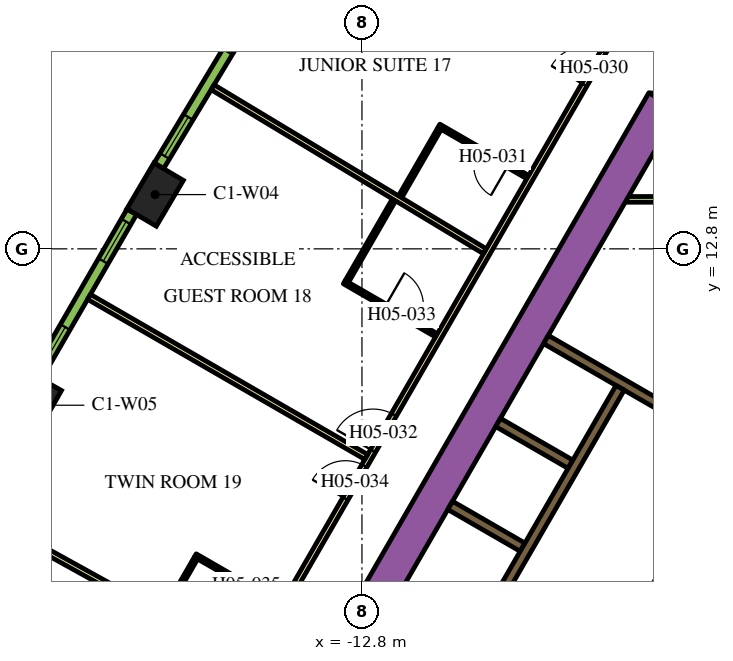
"""IFC4 building model, lengths in metres.
Left out: names, types, materials, properties, quantities, classifications, styles, units other than length and angle.
Written with IfcOpenShell. Run it as: python <this file> out.ifc"""

import sys

from ifc_helpers import new_model, si_unit, direction, frame, frame_2d, origin, origin_2d, place, context, subcontext, project, spatial, polyline, rectangle, outline, extrude, element, fill, save


model = new_model("IFC4")
c1 = context("Model", 3, precision=1e-05, world=origin(), true_north=direction((0.0, 1.0)))
c2 = subcontext(c1, "Body", "Model", "MODEL_VIEW")
j1 = project(units=[si_unit("LENGTHUNIT", "METRE"), si_unit("PLANEANGLEUNIT", "RADIAN")], contexts=[c1])
p1 = place(None, origin())
s1 = spatial("IfcSite", under=j1, at=p1, CompositionType="ELEMENT")
p2 = place(p1, origin())
s2 = spatial("IfcBuilding", under=s1, at=p2, CompositionType="ELEMENT")
p3 = place(p2, frame((0.0, 0.0, 74.4)))
s3 = spatial("IfcBuildingStorey", under=s2, at=p3, CompositionType="ELEMENT", Elevation=74.4)
for number, where, z_axis, x_axis in (
    (1, (-18.243, 14.228, 0.0), (0.0, 0.0, 1.0), (-0.508, -0.861, 0.0)),
    (2, (-21.443, 8.685, 0.0), (0.0, 0.0, 1.0), (-0.492, -0.871, 0.0)),
):
    element("IfcColumn", number, at=place(p3, frame(where, z_axis=z_axis, x_axis=x_axis)), inside=s3, PredefinedType="COLUMN", context=c2, shape_type="SweptSolid", body=[
        extrude(rectangle(XDim=1.4, YDim=0.9, at=origin_2d()), origin(), (0.0, 0.0, 1.0), 3.9),
    ])
p4 = place(p3, frame((-15.36, -1.503, 0.0), z_axis=(0.0, 0.0, 1.0), x_axis=(0.50000389221, 0.866023156604, 0.0)))
e3 = element("IfcWall", 3, at=p4, inside=s3, PredefinedType="SOLIDWALL", context=c2, shape_type="SweptSolid", body=[
    extrude(rectangle(XDim=21.0, YDim=0.9, at=frame_2d((10.5, 0.0))), origin(), (0.0, 0.0, 1.0), 3.9),
])
p5 = place(p3, origin())
e4 = element("IfcWall", 4, at=p5, inside=s3, PredefinedType="SOLIDWALL", context=c2, shape_type="SweptSolid", body=[
    extrude(outline(polyline([(-4.215, 16.9), (-4.469, 16.46), (-5.231, 16.9), (-4.215, 16.9)])), origin(), (0.0, 0.0, 1.0), 3.9),
])
p6 = place(p3, frame((-8.06, -1.311, 0.0), z_axis=(0.0, 0.0, 1.0), x_axis=(0.50000273126, 0.866023826885, 0.0)))
e5 = element("IfcWall", 5, at=p6, inside=s3, PredefinedType="SOLIDWALL", context=c2, shape_type="SweptSolid", body=[
    extrude(rectangle(XDim=10.33, YDim=0.25, at=frame_2d((5.165, 0.0))), origin(), (0.0, 0.0, 1.0), 3.9),
])
for number, where, z_axis, x_axis in (
    (6, (-8.574, 4.95, 0.0), (0.0, 0.0, 1.0), (-0.866, 0.5, 0.0)),
    (7, (-7.314, 7.132, 0.0), (0.0, 0.0, 1.0), (-0.866, 0.5, 0.0)),
):
    element("IfcWall", number, at=place(p3, frame(where, z_axis=z_axis, x_axis=x_axis)), inside=s3, PredefinedType="SOLIDWALL", context=c2, shape_type="SweptSolid", body=[
        extrude(rectangle(XDim=2.2, YDim=0.25, at=frame_2d((1.1, 0.0))), origin(), (0.0, 0.0, 1.0), 3.9),
    ])
p7 = place(p3, frame((-7.959, 10.415, 0.0), z_axis=(0.0, 0.0, 1.0), x_axis=(0.866020958405, -0.500007699544, 0.0)))
e8 = element("IfcWall", 8, at=p7, inside=s3, PredefinedType="SOLIDWALL", context=c2, shape_type="SweptSolid", body=[
    extrude(rectangle(XDim=4.1, YDim=0.25, at=frame_2d((2.05, 0.0))), origin(), (0.0, 0.0, 1.0), 3.9),
])
p8 = place(p3, frame((-5.851, 14.102, 0.0), z_axis=(0.0, 0.0, 1.0), x_axis=(1.0, 0.0, 0.0)))
e9 = element("IfcWall", 9, at=p8, inside=s3, PredefinedType="PARTITIONING", context=c2, shape_type="SweptSolid", body=[
    extrude(rectangle(XDim=1.18, YDim=0.15, at=frame_2d((0.59, 0.0))), origin(), (0.0, 0.0, 1.0), 2.7),
])
p9 = place(p3, frame((-6.008, 9.144, 0.0), z_axis=(0.0, 0.0, 1.0), x_axis=(-0.500006956611, -0.866021387346, 0.0)))
e10 = element("IfcWall", 10, at=p9, inside=s3, PredefinedType="SOLIDWALL", context=c2, shape_type="SweptSolid", body=[
    extrude(rectangle(XDim=9.83, YDim=0.25, at=frame_2d((4.915, 0.0))), origin(), (0.0, 0.0, 1.0), 3.9),
])
p10 = place(p9, frame((6.985, 0.0, 0.0)))
e11 = element("IfcOpeningElement", 11, at=p10, cuts=e10, PredefinedType="OPENING", context=c2, shape_type="SweptSolid", body=[
    extrude(rectangle(XDim=0.9, YDim=2.1, at=frame_2d((0.45, 1.05))), frame((0.0, 0.135, 0.0), z_axis=(0.0, -1.0, 0.0), x_axis=(1.0, 0.0, 0.0)), (0.0, 0.0, 1.0), 0.27),
])
p11 = place(p3, frame((-0.898, 6.194, 0.0), z_axis=(0.0, 0.0, 1.0), x_axis=(-0.499996202215, -0.866027596426, 0.0)))
e12 = element("IfcWall", 12, at=p11, inside=s3, PredefinedType="SOLIDWALL", context=c2, shape_type="SweptSolid", body=[
    extrude(rectangle(XDim=9.83, YDim=0.25, at=frame_2d((4.915, 0.0))), origin(), (0.0, 0.0, 1.0), 3.9),
])
p12 = place(p11, frame((0.585, 0.0, 0.0)))
e13 = element("IfcOpeningElement", 13, at=p12, cuts=e12, PredefinedType="OPENING", context=c2, shape_type="SweptSolid", body=[
    extrude(rectangle(XDim=1.1, YDim=2.1, at=frame_2d((0.55, 1.05))), frame((0.0, 0.135, 0.0), z_axis=(0.0, -1.0, 0.0), x_axis=(1.0, 0.0, 0.0)), (0.0, 0.0, 1.0), 0.27),
])
p13 = place(p11, frame((3.105, 0.0, 0.0)))
e14 = element("IfcOpeningElement", 14, at=p13, cuts=e12, PredefinedType="OPENING", context=c2, shape_type="SweptSolid", body=[
    extrude(rectangle(XDim=1.1, YDim=2.1, at=frame_2d((0.55, 1.05))), frame((0.0, 0.135, 0.0), z_axis=(0.0, -1.0, 0.0), x_axis=(1.0, 0.0, 0.0)), (0.0, 0.0, 1.0), 0.27),
])
p14 = place(p11, frame((5.625, 0.0, 0.0)))
e15 = element("IfcOpeningElement", 15, at=p14, cuts=e12, PredefinedType="OPENING", context=c2, shape_type="SweptSolid", body=[
    extrude(rectangle(XDim=1.1, YDim=2.1, at=frame_2d((0.55, 1.05))), frame((0.0, 0.135, 0.0), z_axis=(0.0, -1.0, 0.0), x_axis=(1.0, 0.0, 0.0)), (0.0, 0.0, 1.0), 0.27),
])
p15 = place(p11, frame((8.145, 0.0, 0.0)))
e16 = element("IfcOpeningElement", 16, at=p15, cuts=e12, PredefinedType="OPENING", context=c2, shape_type="SweptSolid", body=[
    extrude(rectangle(XDim=1.1, YDim=2.1, at=frame_2d((0.55, 1.05))), frame((0.0, 0.135, 0.0), z_axis=(0.0, -1.0, 0.0), x_axis=(1.0, 0.0, 0.0)), (0.0, 0.0, 1.0), 0.27),
])
p16 = place(p3, frame((-19.081, -3.9, 0.0), z_axis=(0.0, 0.0, 1.0), x_axis=(0.499998313975, 0.866026377209, 0.0)))
e17 = element("IfcWall", 17, at=p16, inside=s3, PredefinedType="PARTITIONING", context=c2, shape_type="SweptSolid", body=[
    extrude(rectangle(XDim=25.766, YDim=0.15, at=frame_2d((12.883, 0.0))), origin(), (0.0, 0.0, 1.0), 2.7),
])
p17 = place(p16, frame((24.265, 0.0, 0.0)))
e18 = element("IfcOpeningElement", 18, at=p17, cuts=e17, PredefinedType="OPENING", context=c2, shape_type="SweptSolid", body=[
    extrude(rectangle(XDim=1.0, YDim=2.1, at=frame_2d((0.5, 1.05))), frame((0.0, 0.085, 0.0), z_axis=(0.0, -1.0, 0.0), x_axis=(1.0, 0.0, 0.0)), (0.0, 0.0, 1.0), 0.17),
])
p18 = place(p16, frame((13.146, 0.0, 0.0)))
e19 = element("IfcOpeningElement", 19, at=p18, cuts=e17, PredefinedType="OPENING", context=c2, shape_type="SweptSolid", body=[
    extrude(rectangle(XDim=1.1, YDim=2.1, at=frame_2d((0.55, 1.05))), frame((0.0, 0.085, 0.0), z_axis=(0.0, -1.0, 0.0), x_axis=(1.0, 0.0, 0.0)), (0.0, 0.0, 1.0), 0.17),
])
p19 = place(p16, frame((11.693, 0.0, 0.0)))
e20 = element("IfcOpeningElement", 20, at=p19, cuts=e17, PredefinedType="OPENING", context=c2, shape_type="SweptSolid", body=[
    extrude(rectangle(XDim=1.0, YDim=2.1, at=frame_2d((0.5, 1.05))), frame((0.0, 0.085, 0.0), z_axis=(0.0, -1.0, 0.0), x_axis=(1.0, 0.0, 0.0)), (0.0, 0.0, 1.0), 0.17),
])
p20 = place(p16, frame((0.18, 0.0, 0.0)))
e21 = element("IfcOpeningElement", 21, at=p20, cuts=e17, PredefinedType="OPENING", context=c2, shape_type="SweptSolid", body=[
    extrude(rectangle(XDim=1.0, YDim=2.1, at=frame_2d((0.5, 1.05))), frame((0.0, 0.085, 0.0), z_axis=(0.0, -1.0, 0.0), x_axis=(1.0, 0.0, 0.0)), (0.0, 0.0, 1.0), 0.17),
])
p21 = place(p3, frame((-23.132, 5.962, 0.0), z_axis=(0.0, 0.0, 1.0), x_axis=(0.875121716713, -0.483902863121, 0.0)))
e22 = element("IfcWall", 22, at=p21, inside=s3, PredefinedType="PARTITIONING", context=c2, shape_type="SweptSolid", body=[
    extrude(rectangle(XDim=8.355, YDim=0.15, at=frame_2d((4.178, 0.0))), origin(), (0.0, 0.0, 1.0), 2.7),
])
p22 = place(p3, frame((-19.982, 11.537, 0.0), z_axis=(0.0, 0.0, 1.0), x_axis=(0.866020994654, -0.500007636761, 0.0)))
e23 = element("IfcWall", 23, at=p22, inside=s3, PredefinedType="PARTITIONING", context=c2, shape_type="SweptSolid", body=[
    extrude(rectangle(XDim=8.423, YDim=0.15, at=frame_2d((4.211, 0.0))), origin(), (0.0, 0.0, 1.0), 2.7),
])
p23 = place(p3, frame((-16.729, 17.052, 0.0), z_axis=(0.0, 0.0, 1.0), x_axis=(0.856630606266, -0.515930232113, 0.0)))
e24 = element("IfcWall", 24, at=p23, inside=s3, PredefinedType="PARTITIONING", context=c2, shape_type="SweptSolid", body=[
    extrude(rectangle(XDim=8.355, YDim=0.15, at=frame_2d((4.178, 0.0))), origin(), (0.0, 0.0, 1.0), 2.7),
])
p24 = place(p3, frame((-8.437, 14.687, 0.0), z_axis=(0.0, 0.0, 1.0), x_axis=(-0.866019956843, 0.50000943426, 0.0)))
e25 = element("IfcWall", 25, at=p24, inside=s3, PredefinedType="PARTITIONING", context=c2, shape_type="SweptSolid", body=[
    extrude(rectangle(XDim=2.7, YDim=0.1, at=frame_2d((1.35, 0.0))), origin(), (0.0, 0.0, 1.0), 2.7),
])
p25 = place(p24, frame((0.6, 0.0, 0.0)))
e26 = element("IfcOpeningElement", 26, at=p25, cuts=e25, PredefinedType="OPENING", context=c2, shape_type="SweptSolid", body=[
    extrude(rectangle(XDim=0.9, YDim=2.1, at=frame_2d((0.45, 1.05))), frame((0.0, 0.06, 0.0), z_axis=(0.0, -1.0, 0.0), x_axis=(1.0, 0.0, 0.0)), (0.0, 0.0, 1.0), 0.12),
])
p26 = place(p3, frame((-10.757, 15.969, 0.0), z_axis=(0.0, 0.0, 1.0), x_axis=(-0.499957272447, -0.866050071143, 0.0)))
e27 = element("IfcWall", 27, at=p26, inside=s3, PredefinedType="PARTITIONING", context=c2, shape_type="SweptSolid", body=[
    extrude(rectangle(XDim=2.07, YDim=0.1, at=frame_2d((1.035, 0.0))), origin(), (0.0, 0.0, 1.0), 2.7),
])
p27 = place(p3, frame((-13.265, 11.924, 0.0), z_axis=(0.0, 0.0, 1.0), x_axis=(0.866034573852, -0.49998411664, 0.0)))
e28 = element("IfcWall", 28, at=p27, inside=s3, PredefinedType="PARTITIONING", context=c2, shape_type="SweptSolid", body=[
    extrude(rectangle(XDim=2.8, YDim=0.1, at=frame_2d((1.4, 0.0))), origin(), (0.0, 0.0, 1.0), 2.7),
])
p28 = place(p27, frame((1.25, 0.0, 0.0)))
e29 = element("IfcOpeningElement", 29, at=p28, cuts=e28, PredefinedType="OPENING", context=c2, shape_type="SweptSolid", body=[
    extrude(rectangle(XDim=1.0, YDim=2.1, at=frame_2d((0.5, 1.05))), frame((0.0, 0.06, 0.0), z_axis=(0.0, -1.0, 0.0), x_axis=(1.0, 0.0, 0.0)), (0.0, 0.0, 1.0), 0.12),
])
p29 = place(p3, frame((-13.197, 11.942, 0.0), z_axis=(0.0, 0.0, 1.0), x_axis=(0.499944914708, 0.866057204957, 0.0)))
e30 = element("IfcWall", 30, at=p29, inside=s3, PredefinedType="PARTITIONING", context=c2, shape_type="SweptSolid", body=[
    extrude(rectangle(XDim=2.47, YDim=0.1, at=frame_2d((1.235, 0.0))), origin(), (0.0, 0.0, 1.0), 2.7),
])
p30 = place(p3, frame((-14.935, 3.432, 0.0), z_axis=(0.0, 0.0, 1.0), x_axis=(-0.865997922154, 0.500047596559, 0.0)))
e31 = element("IfcWall", 31, at=p30, inside=s3, PredefinedType="PARTITIONING", context=c2, shape_type="SweptSolid", body=[
    extrude(rectangle(XDim=2.6, YDim=0.1, at=frame_2d((1.3, 0.0))), origin(), (0.0, 0.0, 1.0), 2.7),
])
p31 = place(p30, frame((0.6, 0.0, 0.0)))
e32 = element("IfcOpeningElement", 32, at=p31, cuts=e31, PredefinedType="OPENING", context=c2, shape_type="SweptSolid", body=[
    extrude(rectangle(XDim=0.9, YDim=2.1, at=frame_2d((0.45, 1.05))), frame((0.0, 0.06, 0.0), z_axis=(0.0, -1.0, 0.0), x_axis=(1.0, 0.0, 0.0)), (0.0, 0.0, 1.0), 0.12),
])
p32 = place(p3, frame((-17.168, 4.664, 0.0), z_axis=(0.0, 0.0, 1.0), x_axis=(-0.500085185139, -0.865976216535, 0.0)))
e33 = element("IfcWall", 33, at=p32, inside=s3, PredefinedType="PARTITIONING", context=c2, shape_type="SweptSolid", body=[
    extrude(rectangle(XDim=1.67, YDim=0.1, at=frame_2d((0.835, 0.0))), origin(), (0.0, 0.0, 1.0), 2.7),
])
p33 = place(p3, frame((-15.564, 19.267, 0.0), z_axis=(0.0, 0.0, 1.0), x_axis=(-0.515938796285, -0.856625448191, 0.0)))
e34 = element("IfcWall", 34, at=p33, inside=s3, PredefinedType="SOLIDWALL", context=c2, shape_type="SweptSolid", body=[
    extrude(rectangle(XDim=4.998, YDim=0.29, at=frame_2d((2.499, 0.0))), origin(), (0.0, 0.0, 1.0), 3.6),
])
p34 = place(p33, frame((0.297, 0.0, 0.9)))
e35 = element("IfcOpeningElement", 35, at=p34, cuts=e34, PredefinedType="OPENING", context=c2, shape_type="SweptSolid", body=[
    extrude(rectangle(XDim=1.2, YDim=2.15, at=frame_2d((0.6, 1.075))), frame((0.0, 0.155, 0.0), z_axis=(0.0, -1.0, 0.0), x_axis=(1.0, 0.0, 0.0)), (0.0, 0.0, 1.0), 0.31),
])
p35 = place(p33, frame((3.501, 0.0, 0.9)))
e36 = element("IfcOpeningElement", 36, at=p35, cuts=e34, PredefinedType="OPENING", context=c2, shape_type="SweptSolid", body=[
    extrude(rectangle(XDim=1.2, YDim=2.15, at=frame_2d((0.6, 1.075))), frame((0.0, 0.155, 0.0), z_axis=(0.0, -1.0, 0.0), x_axis=(1.0, 0.0, 0.0)), (0.0, 0.0, 1.0), 0.31),
])
p36 = place(p3, frame((-18.858, 13.773, 0.0), z_axis=(0.0, 0.0, 1.0), x_axis=(-0.50002123722, -0.866013142123, 0.0)))
e37 = element("IfcWall", 37, at=p36, inside=s3, PredefinedType="SOLIDWALL", context=c2, shape_type="SweptSolid", body=[
    extrude(rectangle(XDim=4.998, YDim=0.29, at=frame_2d((2.499, 0.0))), origin(), (0.0, 0.0, 1.0), 3.6),
])
p37 = place(p36, frame((0.297, 0.0, 0.9)))
e38 = element("IfcOpeningElement", 38, at=p37, cuts=e37, PredefinedType="OPENING", context=c2, shape_type="SweptSolid", body=[
    extrude(rectangle(XDim=1.2, YDim=2.15, at=frame_2d((0.6, 1.075))), frame((0.0, 0.155, 0.0), z_axis=(0.0, -1.0, 0.0), x_axis=(1.0, 0.0, 0.0)), (0.0, 0.0, 1.0), 0.31),
])
p38 = place(p36, frame((3.501, 0.0, 0.9)))
e39 = element("IfcOpeningElement", 39, at=p38, cuts=e37, PredefinedType="OPENING", context=c2, shape_type="SweptSolid", body=[
    extrude(rectangle(XDim=1.2, YDim=2.15, at=frame_2d((0.6, 1.075))), frame((0.0, 0.155, 0.0), z_axis=(0.0, -1.0, 0.0), x_axis=(1.0, 0.0, 0.0)), (0.0, 0.0, 1.0), 0.31),
])
p39 = place(p17, origin())
e40 = element("IfcDoor", 40, at=p39, inside=s3, OperationType="SINGLE_SWING_RIGHT", PredefinedType="DOOR", context=c2, shape_type="SweptSolid", body=[
    extrude(rectangle(XDim=1.0, YDim=2.1, at=frame_2d((0.5, 1.05))), frame((0.0, 0.025, 0.0), z_axis=(0.0, -1.0, 0.0), x_axis=(1.0, 0.0, 0.0)), (0.0, 0.0, 1.0), 0.05),
])
fill(e18, e40)
p40 = place(p25, origin())
e41 = element("IfcDoor", 41, at=p40, inside=s3, OperationType="SINGLE_SWING_LEFT", PredefinedType="DOOR", context=c2, shape_type="SweptSolid", body=[
    extrude(rectangle(XDim=0.9, YDim=2.1, at=frame_2d((0.45, 1.05))), frame((0.0, 0.025, 0.0), z_axis=(0.0, -1.0, 0.0), x_axis=(1.0, 0.0, 0.0)), (0.0, 0.0, 1.0), 0.05),
])
fill(e26, e41)
p41 = place(p18, origin())
e42 = element("IfcDoor", 42, at=p41, inside=s3, OperationType="SINGLE_SWING_LEFT", PredefinedType="DOOR", context=c2, shape_type="SweptSolid", body=[
    extrude(rectangle(XDim=1.1, YDim=2.1, at=frame_2d((0.55, 1.05))), frame((0.0, 0.025, 0.0), z_axis=(0.0, -1.0, 0.0), x_axis=(1.0, 0.0, 0.0)), (0.0, 0.0, 1.0), 0.05),
])
fill(e19, e42)
p42 = place(p28, origin())
e43 = element("IfcDoor", 43, at=p42, inside=s3, OperationType="SINGLE_SWING_RIGHT", PredefinedType="DOOR", context=c2, shape_type="SweptSolid", body=[
    extrude(rectangle(XDim=1.0, YDim=2.1, at=frame_2d((0.5, 1.05))), frame((0.0, 0.025, 0.0), z_axis=(0.0, -1.0, 0.0), x_axis=(1.0, 0.0, 0.0)), (0.0, 0.0, 1.0), 0.05),
])
fill(e29, e43)
p43 = place(p19, origin())
e44 = element("IfcDoor", 44, at=p43, inside=s3, OperationType="SINGLE_SWING_RIGHT", PredefinedType="DOOR", context=c2, shape_type="SweptSolid", body=[
    extrude(rectangle(XDim=1.0, YDim=2.1, at=frame_2d((0.5, 1.05))), frame((0.0, 0.025, 0.0), z_axis=(0.0, -1.0, 0.0), x_axis=(1.0, 0.0, 0.0)), (0.0, 0.0, 1.0), 0.05),
])
fill(e20, e44)
p44 = place(p31, origin())
e45 = element("IfcDoor", 45, at=p44, inside=s3, OperationType="SINGLE_SWING_LEFT", PredefinedType="DOOR", context=c2, shape_type="SweptSolid", body=[
    extrude(rectangle(XDim=0.9, YDim=2.1, at=frame_2d((0.45, 1.05))), frame((0.0, 0.025, 0.0), z_axis=(0.0, -1.0, 0.0), x_axis=(1.0, 0.0, 0.0)), (0.0, 0.0, 1.0), 0.05),
])
fill(e32, e45)
p45 = place(p34, origin())
e46 = element("IfcWindow", 46, at=p45, inside=s3, PartitioningType="DOUBLE_PANEL_VERTICAL", PredefinedType="WINDOW", context=c2, shape_type="SweptSolid", body=[
    extrude(rectangle(XDim=1.2, YDim=2.15, at=frame_2d((0.6, 1.075))), frame((0.0, 0.015, 0.0), z_axis=(0.0, -1.0, 0.0), x_axis=(1.0, 0.0, 0.0)), (0.0, 0.0, 1.0), 0.06),
])
fill(e35, e46)
p46 = place(p35, origin())
e47 = element("IfcWindow", 47, at=p46, inside=s3, PartitioningType="DOUBLE_PANEL_VERTICAL", PredefinedType="WINDOW", context=c2, shape_type="SweptSolid", body=[
    extrude(rectangle(XDim=1.2, YDim=2.15, at=frame_2d((0.6, 1.075))), frame((0.0, 0.015, 0.0), z_axis=(0.0, -1.0, 0.0), x_axis=(1.0, 0.0, 0.0)), (0.0, 0.0, 1.0), 0.06),
])
fill(e36, e47)
p47 = place(p37, origin())
e48 = element("IfcWindow", 48, at=p47, inside=s3, PartitioningType="DOUBLE_PANEL_VERTICAL", PredefinedType="WINDOW", context=c2, shape_type="SweptSolid", body=[
    extrude(rectangle(XDim=1.2, YDim=2.15, at=frame_2d((0.6, 1.075))), frame((0.0, 0.015, 0.0), z_axis=(0.0, -1.0, 0.0), x_axis=(1.0, 0.0, 0.0)), (0.0, 0.0, 1.0), 0.06),
])
fill(e38, e48)
p48 = place(p38, origin())
e49 = element("IfcWindow", 49, at=p48, inside=s3, PartitioningType="DOUBLE_PANEL_VERTICAL", PredefinedType="WINDOW", context=c2, shape_type="SweptSolid", body=[
    extrude(rectangle(XDim=1.2, YDim=2.15, at=frame_2d((0.6, 1.075))), frame((0.0, 0.015, 0.0), z_axis=(0.0, -1.0, 0.0), x_axis=(1.0, 0.0, 0.0)), (0.0, 0.0, 1.0), 0.06),
])
fill(e39, e49)
save(model, sys.argv[1])
